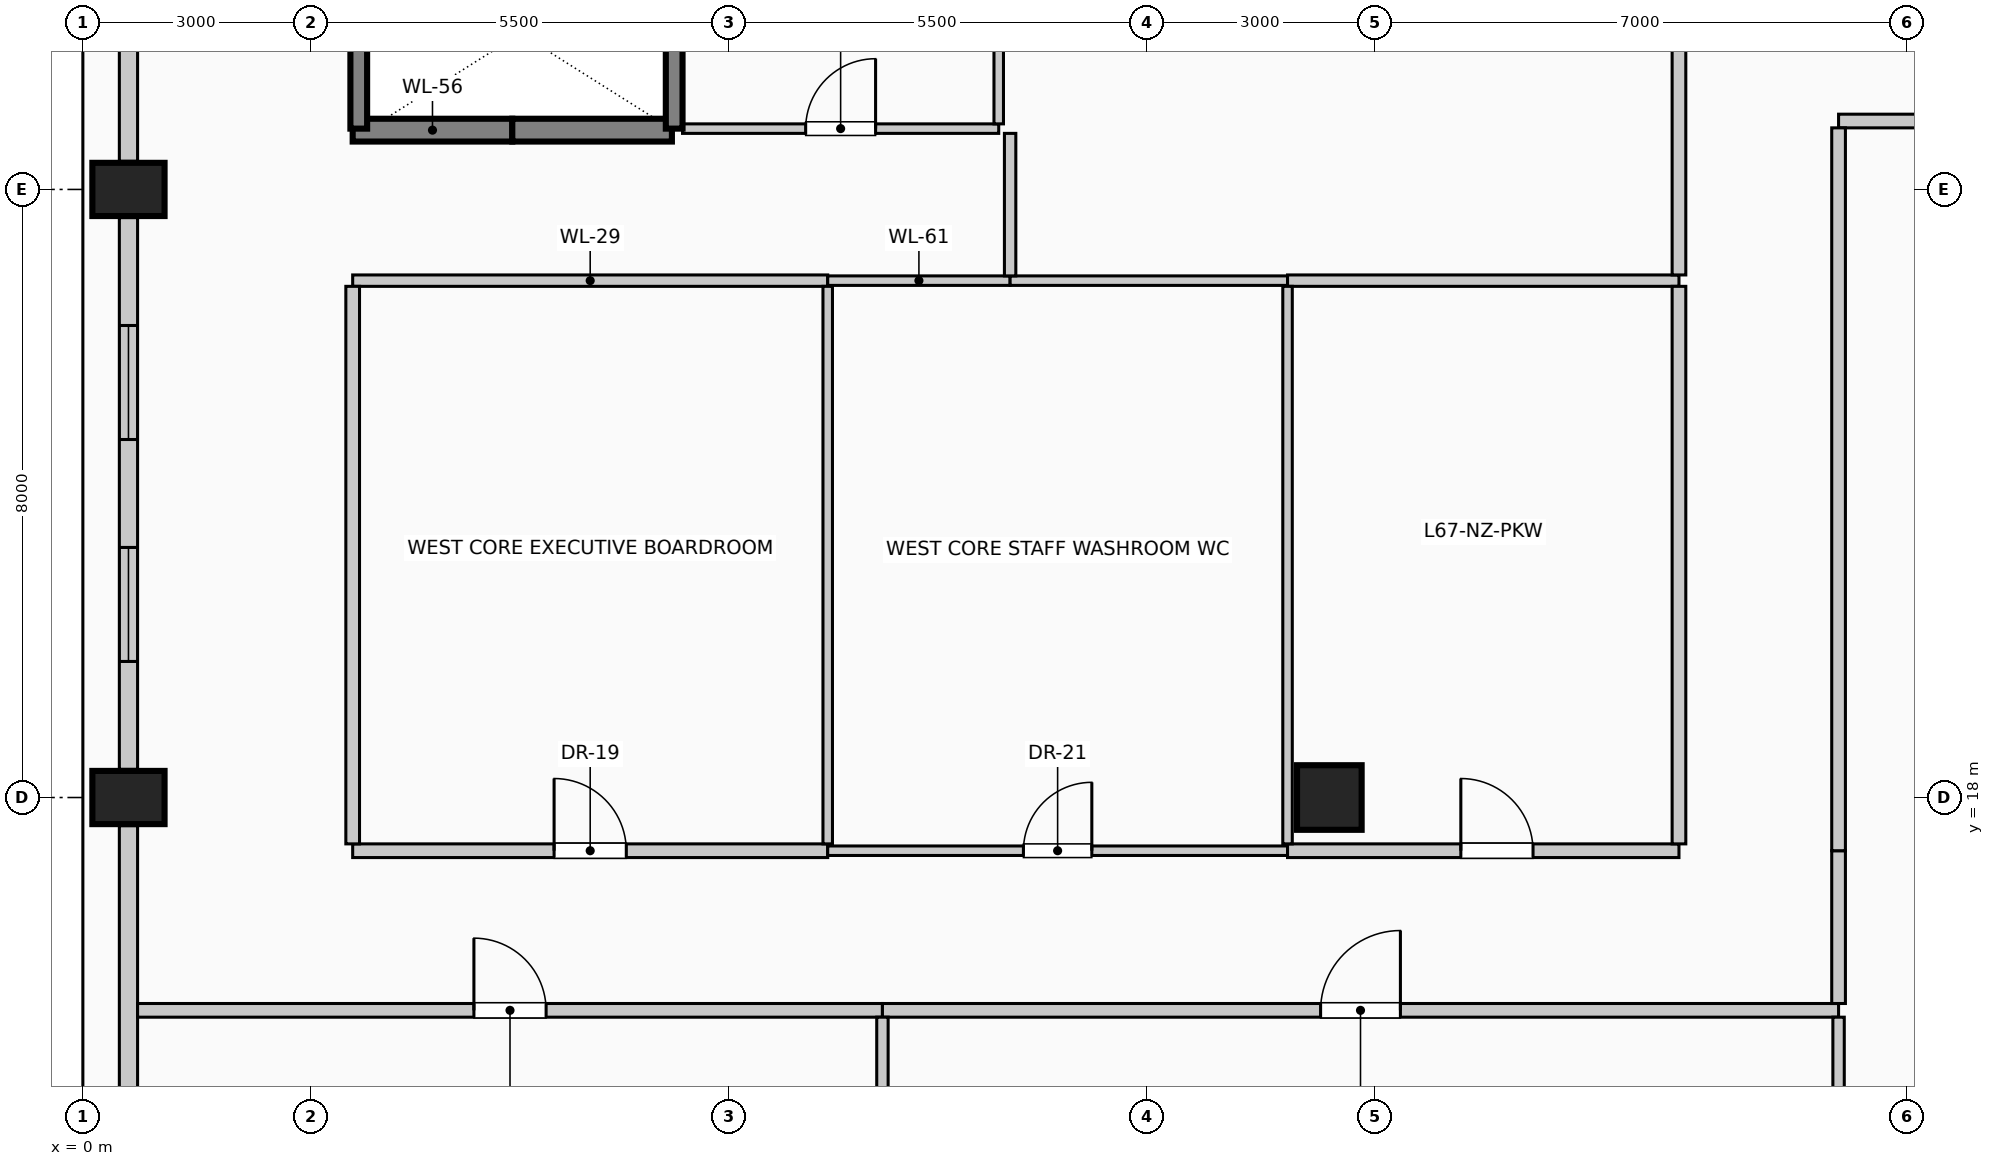
"""IFC4 building model, lengths in metres.
Left out: names, types, materials, properties, quantities, classifications, styles, units other than length and angle.
Written with IfcOpenShell. Run it as: python <this file> out.ifc"""

import sys

from ifc_helpers import new_model, si_unit, direction, frame, frame_2d, origin, origin_2d, place, context, subcontext, project, spatial, rectangle, circle, extrude, element, fill, save


model = new_model("IFC4")
c1 = context("Model", 3, precision=1e-05, world=origin(), true_north=direction((0.0, 1.0)))
c2 = subcontext(c1, "Body", "Model", "MODEL_VIEW")
j1 = project(units=[si_unit("LENGTHUNIT", "METRE"), si_unit("PLANEANGLEUNIT", "RADIAN")], contexts=[c1])
p1 = place(None, origin())
s1 = spatial("IfcSite", under=j1, at=p1, CompositionType="ELEMENT")
p2 = place(p1, origin())
s2 = spatial("IfcBuilding", under=s1, at=p2, CompositionType="ELEMENT")
p3 = place(p2, frame((0.0, 0.0, 276.6)))
s3 = spatial("IfcBuildingStorey", under=s2, at=p3, CompositionType="ELEMENT", Elevation=276.6)
for number, where, z_axis, x_axis in (
    (1, (0.6, 18.0, 0.0), (0.0, 0.0, 1.0), (0.0, 1.0, 0.0)),
    (2, (0.6, 26.0, 0.0), (0.0, 0.0, 1.0), (0.0, 1.0, 0.0)),
):
    element("IfcColumn", number, at=place(p3, frame(where, z_axis=z_axis, x_axis=x_axis)), inside=s3, PredefinedType="COLUMN", context=c2, shape_type="SweptSolid", body=[
        extrude(rectangle(XDim=0.7, YDim=0.95, at=origin_2d()), origin(), (0.0, 0.0, 1.0), 4.0),
    ])
p4 = place(p3, frame((16.4, 18.0, 0.0), z_axis=(0.0, 0.0, 1.0), x_axis=(1.0, 0.0, 0.0)))
e3 = element("IfcColumn", 3, at=p4, inside=s3, PredefinedType="COLUMN", context=c2, shape_type="SweptSolid", body=[
    extrude(circle(Radius=0.425, at=origin_2d()), origin(), (0.0, 0.0, 1.0), 4.0),
])
p5 = place(p3, frame((0.6, 10.37, 0.0), z_axis=(0.0, 0.0, 1.0), x_axis=(0.0, 1.0, 0.0)))
e4 = element("IfcWall", 4, at=p5, inside=s3, PredefinedType="SOLIDWALL", context=c2, shape_type="SweptSolid", body=[
    extrude(rectangle(XDim=7.26, YDim=0.24, at=frame_2d((3.63, 0.0))), origin(), (0.0, 0.0, 1.0), 2.91),
])
p6 = place(p5, frame((1.42, 0.0, 0.42)))
e5 = element("IfcOpeningElement", 5, at=p6, cuts=e4, PredefinedType="OPENING", context=c2, shape_type="SweptSolid", body=[
    extrude(rectangle(XDim=1.5, YDim=2.2, at=frame_2d((0.75, 1.1))), frame((0.0, 0.13, 0.0), z_axis=(0.0, -1.0, 0.0), x_axis=(1.0, 0.0, 0.0)), (0.0, 0.0, 1.0), 0.26),
])
p7 = place(p3, frame((0.6, 18.37, 0.0), z_axis=(0.0, 0.0, 1.0), x_axis=(0.0, 1.0, 0.0)))
e6 = element("IfcWall", 6, at=p7, inside=s3, PredefinedType="SOLIDWALL", context=c2, shape_type="SweptSolid", body=[
    extrude(rectangle(XDim=7.26, YDim=0.24, at=frame_2d((3.63, 0.0))), origin(), (0.0, 0.0, 1.0), 2.91),
])
p8 = place(p7, frame((1.42, 0.0, 0.42)))
e7 = element("IfcOpeningElement", 7, at=p8, cuts=e6, PredefinedType="OPENING", context=c2, shape_type="SweptSolid", body=[
    extrude(rectangle(XDim=1.5, YDim=2.2, at=frame_2d((0.75, 1.1))), frame((0.0, 0.13, 0.0), z_axis=(0.0, -1.0, 0.0), x_axis=(1.0, 0.0, 0.0)), (0.0, 0.0, 1.0), 0.26),
])
p9 = place(p7, frame((4.34, 0.0, 0.42)))
e8 = element("IfcOpeningElement", 8, at=p9, cuts=e6, PredefinedType="OPENING", context=c2, shape_type="SweptSolid", body=[
    extrude(rectangle(XDim=1.5, YDim=2.2, at=frame_2d((0.75, 1.1))), frame((0.0, 0.13, 0.0), z_axis=(0.0, -1.0, 0.0), x_axis=(1.0, 0.0, 0.0)), (0.0, 0.0, 1.0), 0.26),
])
p10 = place(p3, frame((0.6, 26.37, 0.0), z_axis=(0.0, 0.0, 1.0), x_axis=(0.0, 1.0, 0.0)))
e9 = element("IfcWall", 9, at=p10, inside=s3, PredefinedType="SOLIDWALL", context=c2, shape_type="SweptSolid", body=[
    extrude(rectangle(XDim=7.26, YDim=0.24, at=frame_2d((3.63, 0.0))), origin(), (0.0, 0.0, 1.0), 2.91),
])
p11 = place(p3, frame((5.65, 26.78, 0.0), z_axis=(0.0, 0.0, 1.0), x_axis=(-1.0, 0.0, 0.0)))
e10 = element("IfcWall", 10, at=p11, inside=s3, PredefinedType="SOLIDWALL", context=c2, shape_type="SweptSolid", body=[
    extrude(rectangle(XDim=2.1, YDim=0.3, at=frame_2d((1.05, 0.0))), origin(), (0.0, 0.0, 1.0), 4.0),
])
p12 = place(p3, frame((7.75, 26.78, 0.0), z_axis=(0.0, 0.0, 1.0), x_axis=(-1.0, 0.0, 0.0)))
e11 = element("IfcWall", 11, at=p12, inside=s3, PredefinedType="SOLIDWALL", context=c2, shape_type="SweptSolid", body=[
    extrude(rectangle(XDim=2.1, YDim=0.3, at=frame_2d((1.05, 0.0))), origin(), (0.0, 0.0, 1.0), 4.0),
])
p13 = place(p3, frame((3.63, 26.8, 0.0), z_axis=(0.0, 0.0, 1.0), x_axis=(0.0, 1.0, 0.0)))
e12 = element("IfcWall", 12, at=p13, inside=s3, PredefinedType="SOLIDWALL", context=c2, shape_type="SweptSolid", body=[
    extrude(rectangle(XDim=5.55, YDim=0.22, at=frame_2d((2.775, 0.0))), origin(), (0.0, 0.0, 1.0), 4.0),
])
p14 = place(p3, frame((7.78, 26.8, 0.0), z_axis=(0.0, 0.0, 1.0), x_axis=(0.0, 1.0, 0.0)))
e13 = element("IfcWall", 13, at=p14, inside=s3, PredefinedType="SOLIDWALL", context=c2, shape_type="SweptSolid", body=[
    extrude(rectangle(XDim=2.8, YDim=0.22, at=frame_2d((1.4, 0.0))), origin(), (0.0, 0.0, 1.0), 4.0),
])
p15 = place(p3, frame((0.72, 15.2, 0.0), z_axis=(0.0, 0.0, 1.0), x_axis=(1.0, 0.0, 0.0)))
e14 = element("IfcWall", 14, at=p15, inside=s3, PredefinedType="PARTITIONING", context=c2, shape_type="SweptSolid", body=[
    extrude(rectangle(XDim=9.8, YDim=0.18, at=frame_2d((4.9, 0.0))), origin(), (0.0, 0.0, 1.0), 3.66),
])
p16 = place(p15, frame((4.425, 0.0, 0.0)))
e15 = element("IfcOpeningElement", 15, at=p16, cuts=e14, PredefinedType="OPENING", context=c2, shape_type="SweptSolid", body=[
    extrude(rectangle(XDim=0.95, YDim=2.15, at=frame_2d((0.475, 1.075))), frame((0.0, 0.1, 0.0), z_axis=(0.0, -1.0, 0.0), x_axis=(1.0, 0.0, 0.0)), (0.0, 0.0, 1.0), 0.2),
])
p17 = place(p3, frame((10.52, 15.2, 0.0), z_axis=(0.0, 0.0, 1.0), x_axis=(1.0, 0.0, 0.0)))
e16 = element("IfcWall", 16, at=p17, inside=s3, PredefinedType="PARTITIONING", context=c2, shape_type="SweptSolid", body=[
    extrude(rectangle(XDim=12.58, YDim=0.18, at=frame_2d((6.29, 0.0))), origin(), (0.0, 0.0, 1.0), 3.66),
])
p18 = place(p17, frame((5.765, 0.0, 0.0)))
e17 = element("IfcOpeningElement", 17, at=p18, cuts=e16, PredefinedType="OPENING", context=c2, shape_type="SweptSolid", body=[
    extrude(rectangle(XDim=1.05, YDim=2.15, at=frame_2d((0.525, 1.075))), frame((0.0, 0.1, 0.0), z_axis=(0.0, -1.0, 0.0), x_axis=(1.0, 0.0, 0.0)), (0.0, 0.0, 1.0), 0.2),
])
p19 = place(p3, frame((3.55, 17.3, 0.0), z_axis=(0.0, 0.0, 1.0), x_axis=(1.0, 0.0, 0.0)))
e18 = element("IfcWall", 18, at=p19, inside=s3, PredefinedType="PARTITIONING", context=c2, shape_type="SweptSolid", body=[
    extrude(rectangle(XDim=6.25, YDim=0.18, at=frame_2d((3.125, 0.0))), origin(), (0.0, 0.0, 1.0), 3.66),
])
p20 = place(p19, frame((2.65, 0.0, 0.0)))
e19 = element("IfcOpeningElement", 19, at=p20, cuts=e18, PredefinedType="OPENING", context=c2, shape_type="SweptSolid", body=[
    extrude(rectangle(XDim=0.95, YDim=2.15, at=frame_2d((0.475, 1.075))), frame((0.0, 0.1, 0.0), z_axis=(0.0, -1.0, 0.0), x_axis=(1.0, 0.0, 0.0)), (0.0, 0.0, 1.0), 0.2),
])
p21 = place(p3, frame((9.8, 17.3, 0.0), z_axis=(0.0, 0.0, 1.0), x_axis=(1.0, 0.0, 0.0)))
e20 = element("IfcWall", 20, at=p21, inside=s3, PredefinedType="PARTITIONING", context=c2, shape_type="SweptSolid", body=[
    extrude(rectangle(XDim=6.05, YDim=0.125, at=frame_2d((3.025, 0.0))), origin(), (0.0, 0.0, 1.0), 3.66),
])
p22 = place(p21, frame((2.575, 0.0, 0.0)))
e21 = element("IfcOpeningElement", 21, at=p22, cuts=e20, PredefinedType="OPENING", context=c2, shape_type="SweptSolid", body=[
    extrude(rectangle(XDim=0.9, YDim=2.1, at=frame_2d((0.45, 1.05))), frame((0.0, 0.073, 0.0), z_axis=(0.0, -1.0, 0.0), x_axis=(1.0, 0.0, 0.0)), (0.0, 0.0, 1.0), 0.145),
])
p23 = place(p3, frame((15.85, 17.3, 0.0), z_axis=(0.0, 0.0, 1.0), x_axis=(1.0, 0.0, 0.0)))
e22 = element("IfcWall", 22, at=p23, inside=s3, PredefinedType="PARTITIONING", context=c2, shape_type="SweptSolid", body=[
    extrude(rectangle(XDim=5.15, YDim=0.18, at=frame_2d((2.575, 0.0))), origin(), (0.0, 0.0, 1.0), 3.66),
])
p24 = place(p23, frame((2.28, 0.0, 0.0)))
e23 = element("IfcOpeningElement", 23, at=p24, cuts=e22, PredefinedType="OPENING", context=c2, shape_type="SweptSolid", body=[
    extrude(rectangle(XDim=0.95, YDim=2.15, at=frame_2d((0.475, 1.075))), frame((0.0, 0.1, 0.0), z_axis=(0.0, -1.0, 0.0), x_axis=(1.0, 0.0, 0.0)), (0.0, 0.0, 1.0), 0.2),
])
p25 = place(p3, frame((3.55, 24.8, 0.0), z_axis=(0.0, 0.0, 1.0), x_axis=(1.0, 0.0, 0.0)))
e24 = element("IfcWall", 24, at=p25, inside=s3, PredefinedType="PARTITIONING", context=c2, shape_type="SweptSolid", body=[
    extrude(rectangle(XDim=6.25, YDim=0.15, at=frame_2d((3.125, 0.0))), origin(), (0.0, 0.0, 1.0), 3.66),
])
p26 = place(p3, frame((9.8, 24.8, 0.0), z_axis=(0.0, 0.0, 1.0), x_axis=(1.0, 0.0, 0.0)))
e25 = element("IfcWall", 25, at=p26, inside=s3, PredefinedType="PARTITIONING", context=c2, shape_type="SweptSolid", body=[
    extrude(rectangle(XDim=2.4, YDim=0.125, at=frame_2d((1.2, 0.0))), origin(), (0.0, 0.0, 1.0), 3.66),
])
p27 = place(p3, frame((12.2, 24.8, 0.0), z_axis=(0.0, 0.0, 1.0), x_axis=(1.0, 0.0, 0.0)))
e26 = element("IfcWall", 26, at=p27, inside=s3, PredefinedType="PARTITIONING", context=c2, shape_type="SweptSolid", body=[
    extrude(rectangle(XDim=3.65, YDim=0.125, at=frame_2d((1.825, 0.0))), origin(), (0.0, 0.0, 1.0), 3.66),
])
p28 = place(p3, frame((15.85, 24.8, 0.0), z_axis=(0.0, 0.0, 1.0), x_axis=(1.0, 0.0, 0.0)))
e27 = element("IfcWall", 27, at=p28, inside=s3, PredefinedType="PARTITIONING", context=c2, shape_type="SweptSolid", body=[
    extrude(rectangle(XDim=5.15, YDim=0.15, at=frame_2d((2.575, 0.0))), origin(), (0.0, 0.0, 1.0), 3.66),
])
p29 = place(p3, frame((7.89, 26.8, 0.0), z_axis=(0.0, 0.0, 1.0), x_axis=(1.0, 0.0, 0.0)))
e28 = element("IfcWall", 28, at=p29, inside=s3, PredefinedType="PARTITIONING", context=c2, shape_type="SweptSolid", body=[
    extrude(rectangle(XDim=4.16, YDim=0.125, at=frame_2d((2.08, 0.0))), origin(), (0.0, 0.0, 1.0), 3.66),
])
p30 = place(p29, frame((1.62, 0.0, 0.0)))
e29 = element("IfcOpeningElement", 29, at=p30, cuts=e28, PredefinedType="OPENING", context=c2, shape_type="SweptSolid", body=[
    extrude(rectangle(XDim=0.92, YDim=2.1, at=frame_2d((0.46, 1.05))), frame((0.0, 0.073, 0.0), z_axis=(0.0, -1.0, 0.0), x_axis=(1.0, 0.0, 0.0)), (0.0, 0.0, 1.0), 0.145),
])
p31 = place(p3, frame((23.1, 26.9, 0.0), z_axis=(0.0, 0.0, 1.0), x_axis=(1.0, 0.0, 0.0)))
e30 = element("IfcWall", 30, at=p31, inside=s3, PredefinedType="PARTITIONING", context=c2, shape_type="SweptSolid", body=[
    extrude(rectangle(XDim=14.02, YDim=0.18, at=frame_2d((7.01, 0.0))), origin(), (0.0, 0.0, 1.0), 3.66),
])
p32 = place(p31, frame((6.535, 0.0, 0.0)))
e31 = element("IfcOpeningElement", 31, at=p32, cuts=e30, PredefinedType="OPENING", context=c2, shape_type="SweptSolid", body=[
    extrude(rectangle(XDim=0.95, YDim=2.15, at=frame_2d((0.475, 1.075))), frame((0.0, 0.1, 0.0), z_axis=(0.0, -1.0, 0.0), x_axis=(1.0, 0.0, 0.0)), (0.0, 0.0, 1.0), 0.2),
])
p33 = place(p3, frame((3.55, 17.39, 0.0), z_axis=(0.0, 0.0, 1.0), x_axis=(0.0, 1.0, 0.0)))
e32 = element("IfcWall", 32, at=p33, inside=s3, PredefinedType="PARTITIONING", context=c2, shape_type="SweptSolid", body=[
    extrude(rectangle(XDim=7.335, YDim=0.18, at=frame_2d((3.667, 0.0))), origin(), (0.0, 0.0, 1.0), 3.66),
])
p34 = place(p3, frame((9.8, 17.39, 0.0), z_axis=(0.0, 0.0, 1.0), x_axis=(0.0, 1.0, 0.0)))
e33 = element("IfcWall", 33, at=p34, inside=s3, PredefinedType="PARTITIONING", context=c2, shape_type="SweptSolid", body=[
    extrude(rectangle(XDim=7.335, YDim=0.125, at=frame_2d((3.667, 0.0))), origin(), (0.0, 0.0, 1.0), 3.66),
])
p35 = place(p3, frame((10.52, 0.72, 0.0), z_axis=(0.0, 0.0, 1.0), x_axis=(0.0, 1.0, 0.0)))
e34 = element("IfcWall", 34, at=p35, inside=s3, PredefinedType="PARTITIONING", context=c2, shape_type="SweptSolid", body=[
    extrude(rectangle(XDim=14.39, YDim=0.15, at=frame_2d((7.195, 0.0))), origin(), (0.0, 0.0, 1.0), 3.66),
])
p36 = place(p3, frame((12.05, 26.863, 0.0), z_axis=(0.0, 0.0, 1.0), x_axis=(0.0, 1.0, 0.0)))
e35 = element("IfcWall", 35, at=p36, inside=s3, PredefinedType="PARTITIONING", context=c2, shape_type="SweptSolid", body=[
    extrude(rectangle(XDim=2.777, YDim=0.125, at=frame_2d((1.389, 0.0))), origin(), (0.0, 0.0, 1.0), 3.66),
])
p37 = place(p3, frame((12.2, 24.863, 0.0), z_axis=(0.0, 0.0, 1.0), x_axis=(0.0, 1.0, 0.0)))
e36 = element("IfcWall", 36, at=p37, inside=s3, PredefinedType="PARTITIONING", context=c2, shape_type="SweptSolid", body=[
    extrude(rectangle(XDim=1.875, YDim=0.15, at=frame_2d((0.938, 0.0))), origin(), (0.0, 0.0, 1.0), 3.66),
])
p38 = place(p3, frame((15.85, 17.39, 0.0), z_axis=(0.0, 0.0, 1.0), x_axis=(0.0, 1.0, 0.0)))
e37 = element("IfcWall", 37, at=p38, inside=s3, PredefinedType="PARTITIONING", context=c2, shape_type="SweptSolid", body=[
    extrude(rectangle(XDim=7.335, YDim=0.125, at=frame_2d((3.667, 0.0))), origin(), (0.0, 0.0, 1.0), 3.66),
])
p39 = place(p3, frame((21.0, 17.39, 0.0), z_axis=(0.0, 0.0, 1.0), x_axis=(0.0, 1.0, 0.0)))
e38 = element("IfcWall", 38, at=p39, inside=s3, PredefinedType="PARTITIONING", context=c2, shape_type="SweptSolid", body=[
    extrude(rectangle(XDim=7.335, YDim=0.18, at=frame_2d((3.667, 0.0))), origin(), (0.0, 0.0, 1.0), 3.66),
])
p40 = place(p3, frame((21.0, 24.875, 0.0), z_axis=(0.0, 0.0, 1.0), x_axis=(0.0, 1.0, 0.0)))
e39 = element("IfcWall", 39, at=p40, inside=s3, PredefinedType="PARTITIONING", context=c2, shape_type="SweptSolid", body=[
    extrude(rectangle(XDim=7.385, YDim=0.18, at=frame_2d((3.692, 0.0))), origin(), (0.0, 0.0, 1.0), 3.66),
])
p41 = place(p3, frame((23.1, 0.72, 0.0), z_axis=(0.0, 0.0, 1.0), x_axis=(0.0, 1.0, 0.0)))
e40 = element("IfcWall", 40, at=p41, inside=s3, PredefinedType="PARTITIONING", context=c2, shape_type="SweptSolid", body=[
    extrude(rectangle(XDim=14.39, YDim=0.15, at=frame_2d((7.195, 0.0))), origin(), (0.0, 0.0, 1.0), 3.66),
])
p42 = place(p3, frame((23.1, 15.29, 0.0), z_axis=(0.0, 0.0, 1.0), x_axis=(0.0, 1.0, 0.0)))
e41 = element("IfcWall", 41, at=p42, inside=s3, PredefinedType="PARTITIONING", context=c2, shape_type="SweptSolid", body=[
    extrude(rectangle(XDim=2.01, YDim=0.18, at=frame_2d((1.005, 0.0))), origin(), (0.0, 0.0, 1.0), 3.66),
])
p43 = place(p3, frame((23.1, 17.3, 0.0), z_axis=(0.0, 0.0, 1.0), x_axis=(0.0, 1.0, 0.0)))
e42 = element("IfcWall", 42, at=p43, inside=s3, PredefinedType="PARTITIONING", context=c2, shape_type="SweptSolid", body=[
    extrude(rectangle(XDim=9.51, YDim=0.18, at=frame_2d((4.755, 0.0))), origin(), (0.0, 0.0, 1.0), 3.66),
])
p44 = place(p8, origin())
e43 = element("IfcWindow", 43, at=p44, inside=s3, PartitioningType="SINGLE_PANEL", PredefinedType="WINDOW", context=c2, shape_type="SweptSolid", body=[
    extrude(rectangle(XDim=1.5, YDim=2.2, at=frame_2d((0.75, 1.1))), frame((0.0, 0.03, 0.0), z_axis=(0.0, -1.0, 0.0), x_axis=(1.0, 0.0, 0.0)), (0.0, 0.0, 1.0), 0.06),
])
fill(e7, e43)
p45 = place(p9, origin())
e44 = element("IfcWindow", 44, at=p45, inside=s3, PartitioningType="SINGLE_PANEL", PredefinedType="WINDOW", context=c2, shape_type="SweptSolid", body=[
    extrude(rectangle(XDim=1.5, YDim=2.2, at=frame_2d((0.75, 1.1))), frame((0.0, 0.03, 0.0), z_axis=(0.0, -1.0, 0.0), x_axis=(1.0, 0.0, 0.0)), (0.0, 0.0, 1.0), 0.06),
])
fill(e8, e44)
p46 = place(p16, origin())
e45 = element("IfcDoor", 45, at=p46, inside=s3, OperationType="SINGLE_SWING_LEFT", PredefinedType="DOOR", context=c2, shape_type="SweptSolid", body=[
    extrude(rectangle(XDim=0.95, YDim=2.15, at=frame_2d((0.475, 1.075))), frame((0.0, 0.025, 0.0), z_axis=(0.0, -1.0, 0.0), x_axis=(1.0, 0.0, 0.0)), (0.0, 0.0, 1.0), 0.05),
])
fill(e15, e45)
p47 = place(p18, origin())
e46 = element("IfcDoor", 46, at=p47, inside=s3, OperationType="SINGLE_SWING_RIGHT", PredefinedType="DOOR", context=c2, shape_type="SweptSolid", body=[
    extrude(rectangle(XDim=1.05, YDim=2.15, at=frame_2d((0.525, 1.075))), frame((0.0, 0.025, 0.0), z_axis=(0.0, -1.0, 0.0), x_axis=(1.0, 0.0, 0.0)), (0.0, 0.0, 1.0), 0.05),
])
fill(e17, e46)
p48 = place(p20, origin())
e47 = element("IfcDoor", 47, at=p48, inside=s3, OperationType="SINGLE_SWING_LEFT", PredefinedType="DOOR", context=c2, shape_type="SweptSolid", body=[
    extrude(rectangle(XDim=0.95, YDim=2.15, at=frame_2d((0.475, 1.075))), frame((0.0, 0.025, 0.0), z_axis=(0.0, -1.0, 0.0), x_axis=(1.0, 0.0, 0.0)), (0.0, 0.0, 1.0), 0.05),
])
fill(e19, e47)
p49 = place(p22, origin())
e48 = element("IfcDoor", 48, at=p49, inside=s3, OperationType="SINGLE_SWING_RIGHT", PredefinedType="DOOR", context=c2, shape_type="SweptSolid", body=[
    extrude(rectangle(XDim=0.9, YDim=2.1, at=frame_2d((0.45, 1.05))), frame((0.0, 0.025, 0.0), z_axis=(0.0, -1.0, 0.0), x_axis=(1.0, 0.0, 0.0)), (0.0, 0.0, 1.0), 0.05),
])
fill(e21, e48)
p50 = place(p24, origin())
e49 = element("IfcDoor", 49, at=p50, inside=s3, OperationType="SINGLE_SWING_LEFT", PredefinedType="DOOR", context=c2, shape_type="SweptSolid", body=[
    extrude(rectangle(XDim=0.95, YDim=2.15, at=frame_2d((0.475, 1.075))), frame((0.0, 0.025, 0.0), z_axis=(0.0, -1.0, 0.0), x_axis=(1.0, 0.0, 0.0)), (0.0, 0.0, 1.0), 0.05),
])
fill(e23, e49)
p51 = place(p30, origin())
e50 = element("IfcDoor", 50, at=p51, inside=s3, OperationType="SINGLE_SWING_RIGHT", PredefinedType="DOOR", context=c2, shape_type="SweptSolid", body=[
    extrude(rectangle(XDim=0.92, YDim=2.1, at=frame_2d((0.46, 1.05))), frame((0.0, 0.025, 0.0), z_axis=(0.0, -1.0, 0.0), x_axis=(1.0, 0.0, 0.0)), (0.0, 0.0, 1.0), 0.05),
])
fill(e29, e50)
save(model, sys.argv[1])
